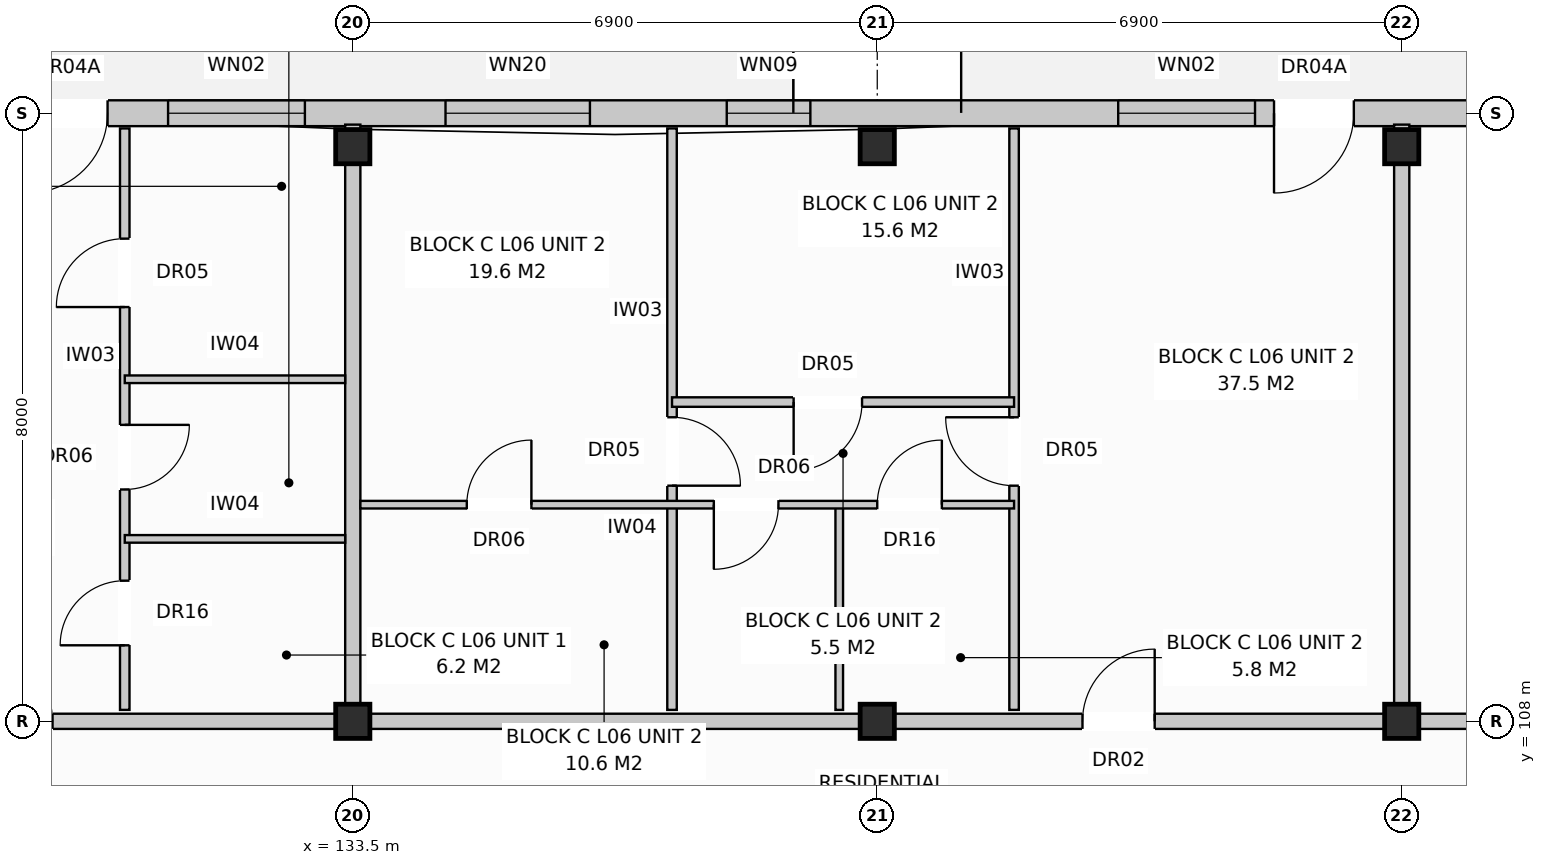
"""IFC4 building model, lengths in metres.
Left out: names, types, materials, properties, quantities, classifications, styles, units other than length and angle.
Written with IfcOpenShell. Run it as: python <this file> out.ifc"""

import sys

from ifc_helpers import new_model, si_unit, direction, frame, frame_2d, origin, origin_with_axes, origin_2d, place, context, subcontext, project, spatial, rectangle, extrude, element, fill, save


model = new_model("IFC4")
c1 = context("Model", 3, precision=1e-05, world=origin(), true_north=direction((0.0, 1.0)))
c2 = subcontext(c1, "Body", "Model", "MODEL_VIEW")
j1 = project(units=[si_unit("LENGTHUNIT", "METRE"), si_unit("PLANEANGLEUNIT", "RADIAN")], contexts=[c1])
p1 = place(None, origin())
s1 = spatial("IfcSite", under=j1, at=p1, CompositionType="ELEMENT")
p2 = place(p1, origin())
s2 = spatial("IfcBuilding", under=s1, at=p2, CompositionType="ELEMENT")
p3 = place(p2, frame((0.0, 0.0, 20.8)))
s3 = spatial("IfcBuildingStorey", under=s2, at=p3, CompositionType="ELEMENT", Elevation=20.8)
for number, where, z_axis, x_axis in (
    (1, (133.5, 108.0, 0.0), (0.0, 0.0, 1.0), (1.0, 0.0, 0.0)),
    (2, (133.5, 115.56, 0.0), (0.0, 0.0, 1.0), (1.0, 0.0, 0.0)),
    (3, (140.4, 108.0, 0.0), (0.0, 0.0, 1.0), (1.0, 0.0, 0.0)),
    (4, (140.4, 115.56, 0.0), (0.0, 0.0, 1.0), (1.0, 0.0, 0.0)),
    (5, (147.3, 108.0, 0.0), (0.0, 0.0, 1.0), (1.0, 0.0, 0.0)),
    (6, (147.3, 115.56, 0.0), (0.0, 0.0, 1.0), (1.0, 0.0, 0.0)),
):
    element("IfcColumn", number, at=place(p3, frame(where, z_axis=z_axis, x_axis=x_axis)), inside=s3, PredefinedType="COLUMN", context=c2, shape_type="SweptSolid", body=[
        extrude(rectangle(XDim=0.45, YDim=0.45, at=origin_2d()), origin(), (0.0, 0.0, 1.0), 3.2),
    ])
p4 = place(p3, frame((126.76, 116.0, 0.0), z_axis=(0.0, 0.0, 1.0), x_axis=(1.0, 0.0, 0.0)))
e7 = element("IfcWall", 7, at=p4, inside=s3, PredefinedType="STANDARD", context=c2, shape_type="SweptSolid", body=[
    extrude(rectangle(XDim=41.08, YDim=0.34, at=frame_2d((20.54, 0.0))), origin(), (0.0, 0.0, 1.0), 2.95),
])
p5 = place(p4, frame((2.464, 0.0, 0.0)))
e8 = element("IfcOpeningElement", 8, at=p5, cuts=e7, PredefinedType="OPENING", context=c2, shape_type="SweptSolid", body=[
    extrude(rectangle(XDim=1.05, YDim=2.12, at=frame_2d((0.525, 1.06))), frame((0.0, 0.182, 0.0), z_axis=(0.0, -1.0, 0.0), x_axis=(1.0, 0.0, 0.0)), (0.0, 0.0, 1.0), 0.364),
])
p6 = place(p4, frame((18.86, 0.0, 0.0)))
e9 = element("IfcOpeningElement", 9, at=p6, cuts=e7, PredefinedType="OPENING", context=c2, shape_type="SweptSolid", body=[
    extrude(rectangle(XDim=1.05, YDim=2.12, at=frame_2d((0.525, 1.06))), frame((0.0, 0.182, 0.0), z_axis=(0.0, -1.0, 0.0), x_axis=(1.0, 0.0, 0.0)), (0.0, 0.0, 1.0), 0.364),
])
p7 = place(p4, frame((28.764, 0.0, 0.0)))
e10 = element("IfcOpeningElement", 10, at=p7, cuts=e7, PredefinedType="OPENING", context=c2, shape_type="SweptSolid", body=[
    extrude(rectangle(XDim=1.05, YDim=2.12, at=frame_2d((0.525, 1.06))), frame((0.0, 0.182, 0.0), z_axis=(0.0, -1.0, 0.0), x_axis=(1.0, 0.0, 0.0)), (0.0, 0.0, 1.0), 0.364),
])
p8 = place(p4, frame((0.76, 0.0, 0.72)))
e11 = element("IfcOpeningElement", 11, at=p8, cuts=e7, PredefinedType="OPENING", context=c2, shape_type="SweptSolid", body=[
    extrude(rectangle(XDim=1.1, YDim=1.5, at=frame_2d((0.55, 0.75))), frame((0.0, 0.182, 0.0), z_axis=(0.0, -1.0, 0.0), x_axis=(1.0, 0.0, 0.0)), (0.0, 0.0, 1.0), 0.364),
])
p9 = place(p4, frame((4.31, 0.0, 0.8)))
e12 = element("IfcOpeningElement", 12, at=p9, cuts=e7, PredefinedType="OPENING", context=c2, shape_type="SweptSolid", body=[
    extrude(rectangle(XDim=1.8, YDim=1.7, at=frame_2d((0.9, 0.85))), frame((0.0, 0.182, 0.0), z_axis=(0.0, -1.0, 0.0), x_axis=(1.0, 0.0, 0.0)), (0.0, 0.0, 1.0), 0.364),
])
p10 = place(p4, frame((7.96, 0.0, 0.72)))
e13 = element("IfcOpeningElement", 13, at=p10, cuts=e7, PredefinedType="OPENING", context=c2, shape_type="SweptSolid", body=[
    extrude(rectangle(XDim=1.9, YDim=1.85, at=frame_2d((0.95, 0.925))), frame((0.0, 0.182, 0.0), z_axis=(0.0, -1.0, 0.0), x_axis=(1.0, 0.0, 0.0)), (0.0, 0.0, 1.0), 0.364),
])
p11 = place(p4, frame((11.66, 0.0, 0.72)))
e14 = element("IfcOpeningElement", 14, at=p11, cuts=e7, PredefinedType="OPENING", context=c2, shape_type="SweptSolid", body=[
    extrude(rectangle(XDim=1.1, YDim=1.5, at=frame_2d((0.55, 0.75))), frame((0.0, 0.182, 0.0), z_axis=(0.0, -1.0, 0.0), x_axis=(1.0, 0.0, 0.0)), (0.0, 0.0, 1.0), 0.364),
])
p12 = place(p4, frame((16.81, 0.0, 0.8)))
e15 = element("IfcOpeningElement", 15, at=p12, cuts=e7, PredefinedType="OPENING", context=c2, shape_type="SweptSolid", body=[
    extrude(rectangle(XDim=1.8, YDim=1.7, at=frame_2d((0.9, 0.85))), frame((0.0, 0.182, 0.0), z_axis=(0.0, -1.0, 0.0), x_axis=(1.0, 0.0, 0.0)), (0.0, 0.0, 1.0), 0.364),
])
p13 = place(p4, frame((22.26, 0.0, 0.72)))
e16 = element("IfcOpeningElement", 16, at=p13, cuts=e7, PredefinedType="OPENING", context=c2, shape_type="SweptSolid", body=[
    extrude(rectangle(XDim=1.9, YDim=1.85, at=frame_2d((0.95, 0.925))), frame((0.0, 0.182, 0.0), z_axis=(0.0, -1.0, 0.0), x_axis=(1.0, 0.0, 0.0)), (0.0, 0.0, 1.0), 0.364),
])
p14 = place(p4, frame((31.135, 0.0, 0.8)))
e17 = element("IfcOpeningElement", 17, at=p14, cuts=e7, PredefinedType="OPENING", context=c2, shape_type="SweptSolid", body=[
    extrude(rectangle(XDim=1.95, YDim=1.65, at=frame_2d((0.975, 0.825))), frame((0.0, 0.182, 0.0), z_axis=(0.0, -1.0, 0.0), x_axis=(1.0, 0.0, 0.0)), (0.0, 0.0, 1.0), 0.364),
])
p15 = place(p4, frame((35.61, 0.0, 0.8)))
e18 = element("IfcOpeningElement", 18, at=p15, cuts=e7, PredefinedType="OPENING", context=c2, shape_type="SweptSolid", body=[
    extrude(rectangle(XDim=1.8, YDim=1.7, at=frame_2d((0.9, 0.85))), frame((0.0, 0.182, 0.0), z_axis=(0.0, -1.0, 0.0), x_axis=(1.0, 0.0, 0.0)), (0.0, 0.0, 1.0), 0.364),
])
p16 = place(p4, frame((39.26, 0.0, 0.72)))
e19 = element("IfcOpeningElement", 19, at=p16, cuts=e7, PredefinedType="OPENING", context=c2, shape_type="SweptSolid", body=[
    extrude(rectangle(XDim=1.1, YDim=1.5, at=frame_2d((0.55, 0.75))), frame((0.0, 0.182, 0.0), z_axis=(0.0, -1.0, 0.0), x_axis=(1.0, 0.0, 0.0)), (0.0, 0.0, 1.0), 0.364),
])
p17 = place(p3, frame((133.5, 108.15, 0.0), z_axis=(0.0, 0.0, 1.0), x_axis=(0.0, 1.0, 0.0)))
e20 = element("IfcWall", 20, at=p17, inside=s3, PredefinedType="PARTITIONING", context=c2, shape_type="SweptSolid", body=[
    extrude(rectangle(XDim=7.7, YDim=0.2, at=frame_2d((3.85, 0.0))), origin(), (0.0, 0.0, 1.0), 2.39),
])
p18 = place(p3, frame((126.6, 108.0, 0.0), z_axis=(0.0, 0.0, 1.0), x_axis=(1.0, 0.0, 0.0)))
e21 = element("IfcWall", 21, at=p18, inside=s3, PredefinedType="PARTITIONING", context=c2, shape_type="SweptSolid", body=[
    extrude(rectangle(XDim=6.9, YDim=0.2, at=frame_2d((3.45, 0.0))), origin(), (0.0, 0.0, 1.0), 2.39),
])
p19 = place(p18, frame((2.0, 0.0, 0.0)))
e22 = element("IfcOpeningElement", 22, at=p19, cuts=e21, PredefinedType="OPENING", context=c2, shape_type="SweptSolid", body=[
    extrude(rectangle(XDim=0.95, YDim=2.15, at=frame_2d((0.475, 1.075))), frame((0.0, 0.112, 0.0), z_axis=(0.0, -1.0, 0.0), x_axis=(1.0, 0.0, 0.0)), (0.0, 0.0, 1.0), 0.224),
])
p20 = place(p3, frame((130.5, 108.15, 0.0), z_axis=(0.0, 0.0, 1.0), x_axis=(0.0, 1.0, 0.0)))
e23 = element("IfcWall", 23, at=p20, inside=s3, PredefinedType="PARTITIONING", context=c2, shape_type="SweptSolid", body=[
    extrude(rectangle(XDim=7.65, YDim=0.125, at=frame_2d((3.825, 0.0))), origin(), (0.0, 0.0, 1.0), 2.95),
])
p21 = place(p20, frame((0.85, 0.0, 0.0)))
e24 = element("IfcOpeningElement", 24, at=p21, cuts=e23, PredefinedType="OPENING", context=c2, shape_type="SweptSolid", body=[
    extrude(rectangle(XDim=0.85, YDim=2.1, at=frame_2d((0.425, 1.05))), frame((0.0, 0.074, 0.0), z_axis=(0.0, -1.0, 0.0), x_axis=(1.0, 0.0, 0.0)), (0.0, 0.0, 1.0), 0.149),
])
p22 = place(p20, frame((2.9, 0.0, 0.0)))
e25 = element("IfcOpeningElement", 25, at=p22, cuts=e23, PredefinedType="OPENING", context=c2, shape_type="SweptSolid", body=[
    extrude(rectangle(XDim=0.85, YDim=2.05, at=frame_2d((0.425, 1.025))), frame((0.0, 0.074, 0.0), z_axis=(0.0, -1.0, 0.0), x_axis=(1.0, 0.0, 0.0)), (0.0, 0.0, 1.0), 0.149),
])
p23 = place(p20, frame((5.3, 0.0, 0.0)))
e26 = element("IfcOpeningElement", 26, at=p23, cuts=e23, PredefinedType="OPENING", context=c2, shape_type="SweptSolid", body=[
    extrude(rectangle(XDim=0.9, YDim=2.1, at=frame_2d((0.45, 1.05))), frame((0.0, 0.074, 0.0), z_axis=(0.0, -1.0, 0.0), x_axis=(1.0, 0.0, 0.0)), (0.0, 0.0, 1.0), 0.149),
])
for number, where, z_axis, x_axis in (
    (27, (130.5, 110.4, 0.0), (0.0, 0.0, 1.0), (1.0, 0.0, 0.0)),
    (28, (130.5, 112.5, 0.0), (0.0, 0.0, 1.0), (1.0, 0.0, 0.0)),
):
    element("IfcWall", number, at=place(p3, frame(where, z_axis=z_axis, x_axis=x_axis)), inside=s3, PredefinedType="PARTITIONING", context=c2, shape_type="SweptSolid", body=[
        extrude(rectangle(XDim=2.9, YDim=0.1, at=frame_2d((1.45, 0.0))), origin(), (0.0, 0.0, 1.0), 2.95),
    ])
p24 = place(p3, frame((147.3, 108.15, 0.0), z_axis=(0.0, 0.0, 1.0), x_axis=(0.0, 1.0, 0.0)))
e29 = element("IfcWall", 29, at=p24, inside=s3, PredefinedType="PARTITIONING", context=c2, shape_type="SweptSolid", body=[
    extrude(rectangle(XDim=7.7, YDim=0.2, at=frame_2d((3.85, 0.0))), origin(), (0.0, 0.0, 1.0), 2.95),
])
p25 = place(p3, frame((133.5, 108.0, 0.0), z_axis=(0.0, 0.0, 1.0), x_axis=(1.0, 0.0, 0.0)))
e30 = element("IfcWall", 30, at=p25, inside=s3, PredefinedType="PARTITIONING", context=c2, shape_type="SweptSolid", body=[
    extrude(rectangle(XDim=13.8, YDim=0.2, at=frame_2d((6.9, 0.0))), origin(), (0.0, 0.0, 1.0), 2.39),
])
p26 = place(p25, frame((9.6, 0.0, 0.0)))
e31 = element("IfcOpeningElement", 31, at=p26, cuts=e30, PredefinedType="OPENING", context=c2, shape_type="SweptSolid", body=[
    extrude(rectangle(XDim=0.95, YDim=2.15, at=frame_2d((0.475, 1.075))), frame((0.0, 0.112, 0.0), z_axis=(0.0, -1.0, 0.0), x_axis=(1.0, 0.0, 0.0)), (0.0, 0.0, 1.0), 0.224),
])
p27 = place(p3, frame((142.2, 108.15, 0.0), z_axis=(0.0, 0.0, 1.0), x_axis=(0.0, 1.0, 0.0)))
e32 = element("IfcWall", 32, at=p27, inside=s3, PredefinedType="PARTITIONING", context=c2, shape_type="SweptSolid", body=[
    extrude(rectangle(XDim=7.65, YDim=0.125, at=frame_2d((3.825, 0.0))), origin(), (0.0, 0.0, 1.0), 2.59),
])
p28 = place(p27, frame((2.95, 0.0, 0.0)))
e33 = element("IfcOpeningElement", 33, at=p28, cuts=e32, PredefinedType="OPENING", context=c2, shape_type="SweptSolid", body=[
    extrude(rectangle(XDim=0.9, YDim=2.1, at=frame_2d((0.45, 1.05))), frame((0.0, 0.074, 0.0), z_axis=(0.0, -1.0, 0.0), x_axis=(1.0, 0.0, 0.0)), (0.0, 0.0, 1.0), 0.149),
])
p29 = place(p3, frame((137.7, 108.15, 0.0), z_axis=(0.0, 0.0, 1.0), x_axis=(0.0, 1.0, 0.0)))
e34 = element("IfcWall", 34, at=p29, inside=s3, PredefinedType="PARTITIONING", context=c2, shape_type="SweptSolid", body=[
    extrude(rectangle(XDim=7.65, YDim=0.125, at=frame_2d((3.825, 0.0))), origin(), (0.0, 0.0, 1.0), 2.95),
])
p30 = place(p29, frame((2.95, 0.0, 0.0)))
e35 = element("IfcOpeningElement", 35, at=p30, cuts=e34, PredefinedType="OPENING", context=c2, shape_type="SweptSolid", body=[
    extrude(rectangle(XDim=0.9, YDim=2.1, at=frame_2d((0.45, 1.05))), frame((0.0, 0.074, 0.0), z_axis=(0.0, -1.0, 0.0), x_axis=(1.0, 0.0, 0.0)), (0.0, 0.0, 1.0), 0.149),
])
p31 = place(p3, frame((139.9, 108.15, 0.0), z_axis=(0.0, 0.0, 1.0), x_axis=(0.0, 1.0, 0.0)))
e36 = element("IfcWall", 36, at=p31, inside=s3, PredefinedType="PARTITIONING", context=c2, shape_type="SweptSolid", body=[
    extrude(rectangle(XDim=2.7, YDim=0.1, at=frame_2d((1.35, 0.0))), origin(), (0.0, 0.0, 1.0), 2.95),
])
p32 = place(p3, frame((133.6, 110.85, 0.0), z_axis=(0.0, 0.0, 1.0), x_axis=(1.0, 0.0, 0.0)))
e37 = element("IfcWall", 37, at=p32, inside=s3, PredefinedType="PARTITIONING", context=c2, shape_type="SweptSolid", body=[
    extrude(rectangle(XDim=8.6, YDim=0.1, at=frame_2d((4.3, 0.0))), origin(), (0.0, 0.0, 1.0), 2.95),
])
p33 = place(p32, frame((1.4, 0.0, 0.0)))
e38 = element("IfcOpeningElement", 38, at=p33, cuts=e37, PredefinedType="OPENING", context=c2, shape_type="SweptSolid", body=[
    extrude(rectangle(XDim=0.85, YDim=2.05, at=frame_2d((0.425, 1.025))), frame((0.0, 0.062, 0.0), z_axis=(0.0, -1.0, 0.0), x_axis=(1.0, 0.0, 0.0)), (0.0, 0.0, 1.0), 0.124),
])
p34 = place(p32, frame((4.65, 0.0, 0.0)))
e39 = element("IfcOpeningElement", 39, at=p34, cuts=e37, PredefinedType="OPENING", context=c2, shape_type="SweptSolid", body=[
    extrude(rectangle(XDim=0.85, YDim=2.05, at=frame_2d((0.425, 1.025))), frame((0.0, 0.062, 0.0), z_axis=(0.0, -1.0, 0.0), x_axis=(1.0, 0.0, 0.0)), (0.0, 0.0, 1.0), 0.124),
])
p35 = place(p32, frame((6.8, 0.0, 0.0)))
e40 = element("IfcOpeningElement", 40, at=p35, cuts=e37, PredefinedType="OPENING", context=c2, shape_type="SweptSolid", body=[
    extrude(rectangle(XDim=0.85, YDim=2.1, at=frame_2d((0.425, 1.05))), frame((0.0, 0.062, 0.0), z_axis=(0.0, -1.0, 0.0), x_axis=(1.0, 0.0, 0.0)), (0.0, 0.0, 1.0), 0.124),
])
p36 = place(p3, frame((137.7, 112.2, 0.0), z_axis=(0.0, 0.0, 1.0), x_axis=(1.0, 0.0, 0.0)))
e41 = element("IfcWall", 41, at=p36, inside=s3, PredefinedType="PARTITIONING", context=c2, shape_type="SweptSolid", body=[
    extrude(rectangle(XDim=4.5, YDim=0.125, at=frame_2d((2.25, 0.0))), origin(), (0.0, 0.0, 1.0), 2.95),
])
p37 = place(p36, frame((1.6, 0.0, 0.0)))
e42 = element("IfcOpeningElement", 42, at=p37, cuts=e41, PredefinedType="OPENING", context=c2, shape_type="SweptSolid", body=[
    extrude(rectangle(XDim=0.9, YDim=2.1, at=frame_2d((0.45, 1.05))), frame((0.0, 0.074, 0.0), z_axis=(0.0, -1.0, 0.0), x_axis=(1.0, 0.0, 0.0)), (0.0, 0.0, 1.0), 0.149),
])
p38 = place(p3, frame((147.3, 108.0, 0.0), z_axis=(0.0, 0.0, 1.0), x_axis=(1.0, 0.0, 0.0)))
e43 = element("IfcWall", 43, at=p38, inside=s3, PredefinedType="PARTITIONING", context=c2, shape_type="SweptSolid", body=[
    extrude(rectangle(XDim=13.8, YDim=0.2, at=frame_2d((6.9, 0.0))), origin(), (0.0, 0.0, 1.0), 2.39),
])
p39 = place(p38, frame((2.4, 0.0, 0.0)))
e44 = element("IfcOpeningElement", 44, at=p39, cuts=e43, PredefinedType="OPENING", context=c2, shape_type="SweptSolid", body=[
    extrude(rectangle(XDim=0.95, YDim=2.15, at=frame_2d((0.475, 1.075))), frame((0.0, 0.112, 0.0), z_axis=(0.0, -1.0, 0.0), x_axis=(1.0, 0.0, 0.0)), (0.0, 0.0, 1.0), 0.224),
])
p40 = place(p5, frame((1.05, 0.0, 0.0), z_axis=(0.0, 0.0, 1.0), x_axis=(-1.0, 0.0, 0.0)))
e45 = element("IfcDoor", 45, at=p40, inside=s3, OperationType="SINGLE_SWING_LEFT", PredefinedType="DOOR", context=c2, shape_type="SweptSolid", body=[
    extrude(rectangle(XDim=1.05, YDim=2.12, at=frame_2d((0.525, 1.06))), frame((0.0, 0.025, 0.0), z_axis=(0.0, -1.0, 0.0), x_axis=(1.0, 0.0, 0.0)), (0.0, 0.0, 1.0), 0.05),
])
fill(e8, e45)
p41 = place(p6, frame((1.05, 0.0, 0.0), z_axis=(0.0, 0.0, 1.0), x_axis=(-1.0, 0.0, 0.0)))
e46 = element("IfcDoor", 46, at=p41, inside=s3, OperationType="SINGLE_SWING_LEFT", PredefinedType="DOOR", context=c2, shape_type="SweptSolid", body=[
    extrude(rectangle(XDim=1.05, YDim=2.12, at=frame_2d((0.525, 1.06))), frame((0.0, 0.025, 0.0), z_axis=(0.0, -1.0, 0.0), x_axis=(1.0, 0.0, 0.0)), (0.0, 0.0, 1.0), 0.05),
])
fill(e9, e46)
p42 = place(p9, origin_with_axes())
e47 = element("IfcWindow", 47, at=p42, inside=s3, PartitioningType="SINGLE_PANEL", PredefinedType="WINDOW", context=c2, shape_type="SweptSolid", body=[
    extrude(rectangle(XDim=1.8, YDim=1.7, at=frame_2d((0.9, 0.85))), frame((0.0, 0.03, 0.0), z_axis=(0.0, -1.0, 0.0), x_axis=(1.0, 0.0, 0.0)), (0.0, 0.0, 1.0), 0.06),
])
fill(e12, e47)
p43 = place(p10, origin_with_axes())
e48 = element("IfcWindow", 48, at=p43, inside=s3, PartitioningType="SINGLE_PANEL", PredefinedType="WINDOW", context=c2, shape_type="SweptSolid", body=[
    extrude(rectangle(XDim=1.9, YDim=1.85, at=frame_2d((0.95, 0.925))), frame((0.0, 0.03, 0.0), z_axis=(0.0, -1.0, 0.0), x_axis=(1.0, 0.0, 0.0)), (0.0, 0.0, 1.0), 0.06),
])
fill(e13, e48)
p44 = place(p11, origin_with_axes())
e49 = element("IfcWindow", 49, at=p44, inside=s3, PartitioningType="SINGLE_PANEL", PredefinedType="WINDOW", context=c2, shape_type="SweptSolid", body=[
    extrude(rectangle(XDim=1.1, YDim=1.5, at=frame_2d((0.55, 0.75))), frame((0.0, 0.03, 0.0), z_axis=(0.0, -1.0, 0.0), x_axis=(1.0, 0.0, 0.0)), (0.0, 0.0, 1.0), 0.06),
])
fill(e14, e49)
p45 = place(p12, origin_with_axes())
e50 = element("IfcWindow", 50, at=p45, inside=s3, PartitioningType="SINGLE_PANEL", PredefinedType="WINDOW", context=c2, shape_type="SweptSolid", body=[
    extrude(rectangle(XDim=1.8, YDim=1.7, at=frame_2d((0.9, 0.85))), frame((0.0, 0.03, 0.0), z_axis=(0.0, -1.0, 0.0), x_axis=(1.0, 0.0, 0.0)), (0.0, 0.0, 1.0), 0.06),
])
fill(e15, e50)
p46 = place(p19, origin_with_axes())
e51 = element("IfcDoor", 51, at=p46, inside=s3, OperationType="SINGLE_SWING_LEFT", PredefinedType="DOOR", context=c2, shape_type="SweptSolid", body=[
    extrude(rectangle(XDim=0.95, YDim=2.15, at=frame_2d((0.475, 1.075))), frame((0.0, 0.025, 0.0), z_axis=(0.0, -1.0, 0.0), x_axis=(1.0, 0.0, 0.0)), (0.0, 0.0, 1.0), 0.05),
])
fill(e22, e51)
p47 = place(p21, origin_with_axes())
e52 = element("IfcDoor", 52, at=p47, inside=s3, OperationType="SINGLE_SWING_LEFT", PredefinedType="DOOR", context=c2, shape_type="SweptSolid", body=[
    extrude(rectangle(XDim=0.85, YDim=2.1, at=frame_2d((0.425, 1.05))), frame((0.0, 0.025, 0.0), z_axis=(0.0, -1.0, 0.0), x_axis=(1.0, 0.0, 0.0)), (0.0, 0.0, 1.0), 0.05),
])
fill(e24, e52)
p48 = place(p22, frame((0.85, 0.0, 0.0), z_axis=(0.0, 0.0, 1.0), x_axis=(-1.0, 0.0, 0.0)))
e53 = element("IfcDoor", 53, at=p48, inside=s3, OperationType="SINGLE_SWING_RIGHT", PredefinedType="DOOR", context=c2, shape_type="SweptSolid", body=[
    extrude(rectangle(XDim=0.85, YDim=2.05, at=frame_2d((0.425, 1.025))), frame((0.0, 0.025, 0.0), z_axis=(0.0, -1.0, 0.0), x_axis=(1.0, 0.0, 0.0)), (0.0, 0.0, 1.0), 0.05),
])
fill(e25, e53)
p49 = place(p23, origin_with_axes())
e54 = element("IfcDoor", 54, at=p49, inside=s3, OperationType="SINGLE_SWING_LEFT", PredefinedType="DOOR", context=c2, shape_type="SweptSolid", body=[
    extrude(rectangle(XDim=0.9, YDim=2.1, at=frame_2d((0.45, 1.05))), frame((0.0, 0.025, 0.0), z_axis=(0.0, -1.0, 0.0), x_axis=(1.0, 0.0, 0.0)), (0.0, 0.0, 1.0), 0.05),
])
fill(e26, e54)
p50 = place(p26, origin_with_axes())
e55 = element("IfcDoor", 55, at=p50, inside=s3, OperationType="SINGLE_SWING_RIGHT", PredefinedType="DOOR", context=c2, shape_type="SweptSolid", body=[
    extrude(rectangle(XDim=0.95, YDim=2.15, at=frame_2d((0.475, 1.075))), frame((0.0, 0.025, 0.0), z_axis=(0.0, -1.0, 0.0), x_axis=(1.0, 0.0, 0.0)), (0.0, 0.0, 1.0), 0.05),
])
fill(e31, e55)
p51 = place(p28, origin_with_axes())
e56 = element("IfcDoor", 56, at=p51, inside=s3, OperationType="SINGLE_SWING_RIGHT", PredefinedType="DOOR", context=c2, shape_type="SweptSolid", body=[
    extrude(rectangle(XDim=0.9, YDim=2.1, at=frame_2d((0.45, 1.05))), frame((0.0, 0.025, 0.0), z_axis=(0.0, -1.0, 0.0), x_axis=(1.0, 0.0, 0.0)), (0.0, 0.0, 1.0), 0.05),
])
fill(e33, e56)
p52 = place(p30, frame((0.9, 0.0, 0.0), z_axis=(0.0, 0.0, 1.0), x_axis=(-1.0, 0.0, 0.0)))
e57 = element("IfcDoor", 57, at=p52, inside=s3, OperationType="SINGLE_SWING_LEFT", PredefinedType="DOOR", context=c2, shape_type="SweptSolid", body=[
    extrude(rectangle(XDim=0.9, YDim=2.1, at=frame_2d((0.45, 1.05))), frame((0.0, 0.025, 0.0), z_axis=(0.0, -1.0, 0.0), x_axis=(1.0, 0.0, 0.0)), (0.0, 0.0, 1.0), 0.05),
])
fill(e35, e57)
p53 = place(p33, origin_with_axes())
e58 = element("IfcDoor", 58, at=p53, inside=s3, OperationType="SINGLE_SWING_RIGHT", PredefinedType="DOOR", context=c2, shape_type="SweptSolid", body=[
    extrude(rectangle(XDim=0.85, YDim=2.05, at=frame_2d((0.425, 1.025))), frame((0.0, 0.025, 0.0), z_axis=(0.0, -1.0, 0.0), x_axis=(1.0, 0.0, 0.0)), (0.0, 0.0, 1.0), 0.05),
])
fill(e38, e58)
p54 = place(p34, frame((0.85, 0.0, 0.0), z_axis=(0.0, 0.0, 1.0), x_axis=(-1.0, 0.0, 0.0)))
e59 = element("IfcDoor", 59, at=p54, inside=s3, OperationType="SINGLE_SWING_LEFT", PredefinedType="DOOR", context=c2, shape_type="SweptSolid", body=[
    extrude(rectangle(XDim=0.85, YDim=2.05, at=frame_2d((0.425, 1.025))), frame((0.0, 0.025, 0.0), z_axis=(0.0, -1.0, 0.0), x_axis=(1.0, 0.0, 0.0)), (0.0, 0.0, 1.0), 0.05),
])
fill(e39, e59)
p55 = place(p35, origin_with_axes())
e60 = element("IfcDoor", 60, at=p55, inside=s3, OperationType="SINGLE_SWING_RIGHT", PredefinedType="DOOR", context=c2, shape_type="SweptSolid", body=[
    extrude(rectangle(XDim=0.85, YDim=2.1, at=frame_2d((0.425, 1.05))), frame((0.0, 0.025, 0.0), z_axis=(0.0, -1.0, 0.0), x_axis=(1.0, 0.0, 0.0)), (0.0, 0.0, 1.0), 0.05),
])
fill(e40, e60)
p56 = place(p37, frame((0.9, 0.0, 0.0), z_axis=(0.0, 0.0, 1.0), x_axis=(-1.0, 0.0, 0.0)))
e61 = element("IfcDoor", 61, at=p56, inside=s3, OperationType="SINGLE_SWING_LEFT", PredefinedType="DOOR", context=c2, shape_type="SweptSolid", body=[
    extrude(rectangle(XDim=0.9, YDim=2.1, at=frame_2d((0.45, 1.05))), frame((0.0, 0.025, 0.0), z_axis=(0.0, -1.0, 0.0), x_axis=(1.0, 0.0, 0.0)), (0.0, 0.0, 1.0), 0.05),
])
fill(e42, e61)
save(model, sys.argv[1])
